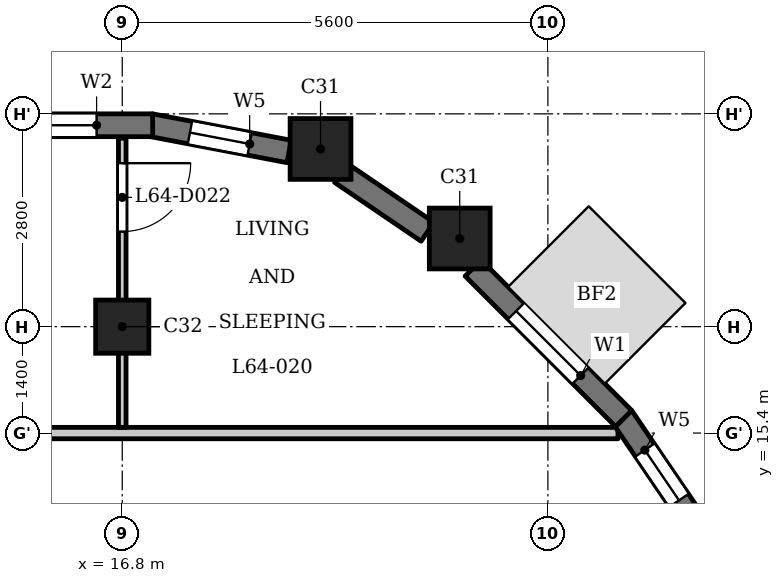
"""IFC4 building model, lengths in metres.
Left out: names, types, materials, properties, quantities, classifications, styles, units other than length and angle.
Written with IfcOpenShell. Run it as: python <this file> out.ifc"""

import sys

from ifc_helpers import new_model, si_unit, direction, frame, frame_2d, origin, origin_2d, place, context, subcontext, project, spatial, rectangle, extrude, element, fill, save


model = new_model("IFC4")
c1 = context("Model", 3, precision=1e-05, world=origin(), true_north=direction((0.0, 1.0)))
c2 = subcontext(c1, "Body", "Model", "MODEL_VIEW")
j1 = project(units=[si_unit("LENGTHUNIT", "METRE"), si_unit("PLANEANGLEUNIT", "RADIAN")], contexts=[c1])
p1 = place(None, origin())
s1 = spatial("IfcSite", under=j1, at=p1, CompositionType="ELEMENT")
p2 = place(p1, origin())
s2 = spatial("IfcBuilding", under=s1, at=p2, CompositionType="ELEMENT")
p3 = place(p2, frame((0.0, 0.0, 248.7)))
s3 = spatial("IfcBuildingStorey", under=s2, at=p3, CompositionType="ELEMENT", Elevation=248.7)
for number, where, z_axis, x_axis in (
    (1, (21.24, 17.96, 0.0), (0.0, 0.0, 1.0), (1.0, 0.0, 0.0)),
    (2, (19.409, 19.138, 0.0), (0.0, 0.0, 1.0), (1.0, 0.0, 0.0)),
):
    element("IfcColumn", number, at=place(p3, frame(where, z_axis=z_axis, x_axis=x_axis)), inside=s3, PredefinedType="COLUMN", context=c2, shape_type="SweptSolid", body=[
        extrude(rectangle(XDim=0.8, YDim=0.8, at=origin_2d()), origin(), (0.0, 0.0, 1.0), 3.5),
    ])
p4 = place(p3, frame((16.8, 16.8, 0.0), z_axis=(0.0, 0.0, 1.0), x_axis=(1.0, 0.0, 0.0)))
e3 = element("IfcColumn", 3, at=p4, inside=s3, PredefinedType="COLUMN", context=c2, shape_type="SweptSolid", body=[
    extrude(rectangle(XDim=0.7, YDim=0.7, at=origin_2d()), origin(), (0.0, 0.0, 1.0), 3.5),
])
p5 = place(p3, frame((24.422, 14.078, 0.0), z_axis=(0.0, 0.0, 1.0), x_axis=(-0.562054549384, 0.827100165347, 0.0)))
e4 = element("IfcWall", 4, at=p5, inside=s3, PredefinedType="SOLIDWALL", context=c2, shape_type="SweptSolid", body=[
    extrude(rectangle(XDim=1.856, YDim=0.3, at=frame_2d((0.928, 0.0))), origin(), (0.0, 0.0, 1.0), 2.55),
])
p6 = place(p5, frame((0.528, 0.0, 0.6)))
e5 = element("IfcOpeningElement", 5, at=p6, cuts=e4, PredefinedType="OPENING", context=c2, shape_type="SweptSolid", body=[
    extrude(rectangle(XDim=0.8, YDim=1.55, at=frame_2d((0.4, 0.775))), frame((0.0, 0.16, 0.0), z_axis=(0.0, -1.0, 0.0), x_axis=(1.0, 0.0, 0.0)), (0.0, 0.0, 1.0), 0.32),
])
p7 = place(p3, frame((23.397, 15.591, 0.0), z_axis=(0.0, 0.0, 1.0), x_axis=(-0.707150377276, 0.707063182409, 0.0)))
e6 = element("IfcWall", 6, at=p7, inside=s3, PredefinedType="SOLIDWALL", context=c2, shape_type="SweptSolid", body=[
    extrude(rectangle(XDim=2.8, YDim=0.3, at=frame_2d((1.4, 0.0))), origin(), (0.0, 0.0, 1.0), 2.55),
])
p8 = place(p7, frame((0.8, 0.0, 0.6)))
e7 = element("IfcOpeningElement", 7, at=p8, cuts=e6, PredefinedType="OPENING", context=c2, shape_type="SweptSolid", body=[
    extrude(rectangle(XDim=1.2, YDim=1.55, at=frame_2d((0.6, 0.775))), frame((0.0, 0.16, 0.0), z_axis=(0.0, -1.0, 0.0), x_axis=(1.0, 0.0, 0.0)), (0.0, 0.0, 1.0), 0.32),
])
p9 = place(p3, frame((20.817, 18.048, 0.0), z_axis=(0.0, 0.0, 1.0), x_axis=(-0.827025410886, 0.562164539747, 0.0)))
e8 = element("IfcWall", 8, at=p9, inside=s3, PredefinedType="SOLIDWALL", context=c2, shape_type="SweptSolid", body=[
    extrude(rectangle(XDim=1.377, YDim=0.3, at=frame_2d((0.688, 0.0))), origin(), (0.0, 0.0, 1.0), 2.55),
])
p10 = place(p3, frame((18.995, 19.105, 0.0), z_axis=(0.0, 0.0, 1.0), x_axis=(-0.982301706131, 0.187305520826, 0.0)))
e9 = element("IfcWall", 9, at=p10, inside=s3, PredefinedType="SOLIDWALL", context=c2, shape_type="SweptSolid", body=[
    extrude(rectangle(XDim=1.856, YDim=0.3, at=frame_2d((0.928, 0.0))), origin(), (0.0, 0.0, 1.0), 2.55),
])
p11 = place(p10, frame((0.528, 0.0, 0.6)))
e10 = element("IfcOpeningElement", 10, at=p11, cuts=e9, PredefinedType="OPENING", context=c2, shape_type="SweptSolid", body=[
    extrude(rectangle(XDim=0.8, YDim=1.55, at=frame_2d((0.4, 0.775))), frame((0.0, 0.16, 0.0), z_axis=(0.0, -1.0, 0.0), x_axis=(1.0, 0.0, 0.0)), (0.0, 0.0, 1.0), 0.32),
])
p12 = place(p3, frame((17.2, 19.45, 0.0), z_axis=(0.0, 0.0, 1.0), x_axis=(-1.0, 0.0, 0.0)))
e11 = element("IfcWall", 11, at=p12, inside=s3, PredefinedType="SOLIDWALL", context=c2, shape_type="SweptSolid", body=[
    extrude(rectangle(XDim=2.8, YDim=0.3, at=frame_2d((1.4, 0.0))), origin(), (0.0, 0.0, 1.0), 2.55),
])
p13 = place(p12, frame((0.738, 0.0, 0.9)))
e12 = element("IfcOpeningElement", 12, at=p13, cuts=e11, PredefinedType="OPENING", context=c2, shape_type="SweptSolid", body=[
    extrude(rectangle(XDim=1.8, YDim=1.25, at=frame_2d((0.9, 0.625))), frame((0.0, 0.16, 0.0), z_axis=(0.0, -1.0, 0.0), x_axis=(1.0, 0.0, 0.0)), (0.0, 0.0, 1.0), 0.32),
])
p14 = place(p3, frame((-23.55, 15.4, 0.0), z_axis=(0.0, 0.0, 1.0), x_axis=(1.0, 0.0, 0.0)))
e13 = element("IfcWall", 13, at=p14, inside=s3, PredefinedType="PARTITIONING", context=c2, shape_type="SweptSolid", body=[
    extrude(rectangle(XDim=46.872, YDim=0.15, at=frame_2d((23.436, 0.0))), origin(), (0.0, 0.0, 1.0), 3.2),
])
p15 = place(p14, frame((8.05, 0.0, 0.0)))
e14 = element("IfcOpeningElement", 14, at=p15, cuts=e13, PredefinedType="OPENING", context=c2, shape_type="SweptSolid", body=[
    extrude(rectangle(XDim=1.0, YDim=2.1, at=frame_2d((0.5, 1.05))), frame((0.0, 0.085, 0.0), z_axis=(0.0, -1.0, 0.0), x_axis=(1.0, 0.0, 0.0)), (0.0, 0.0, 1.0), 0.17),
])
p16 = place(p14, frame((15.05, 0.0, 0.0)))
e15 = element("IfcOpeningElement", 15, at=p16, cuts=e13, PredefinedType="OPENING", context=c2, shape_type="SweptSolid", body=[
    extrude(rectangle(XDim=1.0, YDim=2.1, at=frame_2d((0.5, 1.05))), frame((0.0, 0.085, 0.0), z_axis=(0.0, -1.0, 0.0), x_axis=(1.0, 0.0, 0.0)), (0.0, 0.0, 1.0), 0.17),
])
p17 = place(p14, frame((30.95, 0.0, 0.0)))
e16 = element("IfcOpeningElement", 16, at=p17, cuts=e13, PredefinedType="OPENING", context=c2, shape_type="SweptSolid", body=[
    extrude(rectangle(XDim=1.0, YDim=2.1, at=frame_2d((0.5, 1.05))), frame((0.0, 0.085, 0.0), z_axis=(0.0, -1.0, 0.0), x_axis=(1.0, 0.0, 0.0)), (0.0, 0.0, 1.0), 0.17),
])
p18 = place(p14, frame((38.2, 0.0, 0.0)))
e17 = element("IfcOpeningElement", 17, at=p18, cuts=e13, PredefinedType="OPENING", context=c2, shape_type="SweptSolid", body=[
    extrude(rectangle(XDim=1.0, YDim=2.1, at=frame_2d((0.5, 1.05))), frame((0.0, 0.085, 0.0), z_axis=(0.0, -1.0, 0.0), x_axis=(1.0, 0.0, 0.0)), (0.0, 0.0, 1.0), 0.17),
])
p19 = place(p3, frame((16.8, 15.475, 0.0), z_axis=(0.0, 0.0, 1.0), x_axis=(0.0, 1.0, 0.0)))
e18 = element("IfcWall", 18, at=p19, inside=s3, PredefinedType="PARTITIONING", context=c2, shape_type="SweptSolid", body=[
    extrude(rectangle(XDim=3.805, YDim=0.1, at=frame_2d((1.902, 0.0))), origin(), (0.0, 0.0, 1.0), 3.2),
])
p20 = place(p19, frame((2.576, 0.0, 0.0)))
e19 = element("IfcOpeningElement", 19, at=p20, cuts=e18, PredefinedType="OPENING", context=c2, shape_type="SweptSolid", body=[
    extrude(rectangle(XDim=0.9, YDim=2.1, at=frame_2d((0.45, 1.05))), frame((0.0, 0.06, 0.0), z_axis=(0.0, -1.0, 0.0), x_axis=(1.0, 0.0, 0.0)), (0.0, 0.0, 1.0), 0.12),
])
p21 = place(p20, origin())
e20 = element("IfcDoor", 20, at=p21, inside=s3, OperationType="SINGLE_SWING_RIGHT", PredefinedType="DOOR", context=c2, shape_type="SweptSolid", body=[
    extrude(rectangle(XDim=0.9, YDim=2.1, at=frame_2d((0.45, 1.05))), frame((0.0, 0.025, 0.0), z_axis=(0.0, -1.0, 0.0), x_axis=(1.0, 0.0, 0.0)), (0.0, 0.0, 1.0), 0.05),
])
fill(e19, e20)
p22 = place(p6, origin())
e21 = element("IfcWindow", 21, at=p22, inside=s3, PartitioningType="SINGLE_PANEL", PredefinedType="WINDOW", context=c2, shape_type="SweptSolid", body=[
    extrude(rectangle(XDim=0.8, YDim=1.55, at=frame_2d((0.4, 0.775))), frame((0.0, 0.03, 0.0), z_axis=(0.0, -1.0, 0.0), x_axis=(1.0, 0.0, 0.0)), (0.0, 0.0, 1.0), 0.06),
])
fill(e5, e21)
p23 = place(p8, origin())
e22 = element("IfcWindow", 22, at=p23, inside=s3, PartitioningType="SINGLE_PANEL", PredefinedType="WINDOW", context=c2, shape_type="SweptSolid", body=[
    extrude(rectangle(XDim=1.2, YDim=1.55, at=frame_2d((0.6, 0.775))), frame((0.0, 0.03, 0.0), z_axis=(0.0, -1.0, 0.0), x_axis=(1.0, 0.0, 0.0)), (0.0, 0.0, 1.0), 0.06),
])
fill(e7, e22)
p24 = place(p11, origin())
e23 = element("IfcWindow", 23, at=p24, inside=s3, PartitioningType="SINGLE_PANEL", PredefinedType="WINDOW", context=c2, shape_type="SweptSolid", body=[
    extrude(rectangle(XDim=0.8, YDim=1.55, at=frame_2d((0.4, 0.775))), frame((0.0, 0.03, 0.0), z_axis=(0.0, -1.0, 0.0), x_axis=(1.0, 0.0, 0.0)), (0.0, 0.0, 1.0), 0.06),
])
fill(e10, e23)
p25 = place(p13, origin())
e24 = element("IfcWindow", 24, at=p25, inside=s3, PartitioningType="SINGLE_PANEL", PredefinedType="WINDOW", context=c2, shape_type="SweptSolid", body=[
    extrude(rectangle(XDim=1.8, YDim=1.25, at=frame_2d((0.9, 0.625))), frame((0.0, 0.03, 0.0), z_axis=(0.0, -1.0, 0.0), x_axis=(1.0, 0.0, 0.0)), (0.0, 0.0, 1.0), 0.06),
])
fill(e12, e24)
save(model, sys.argv[1])
